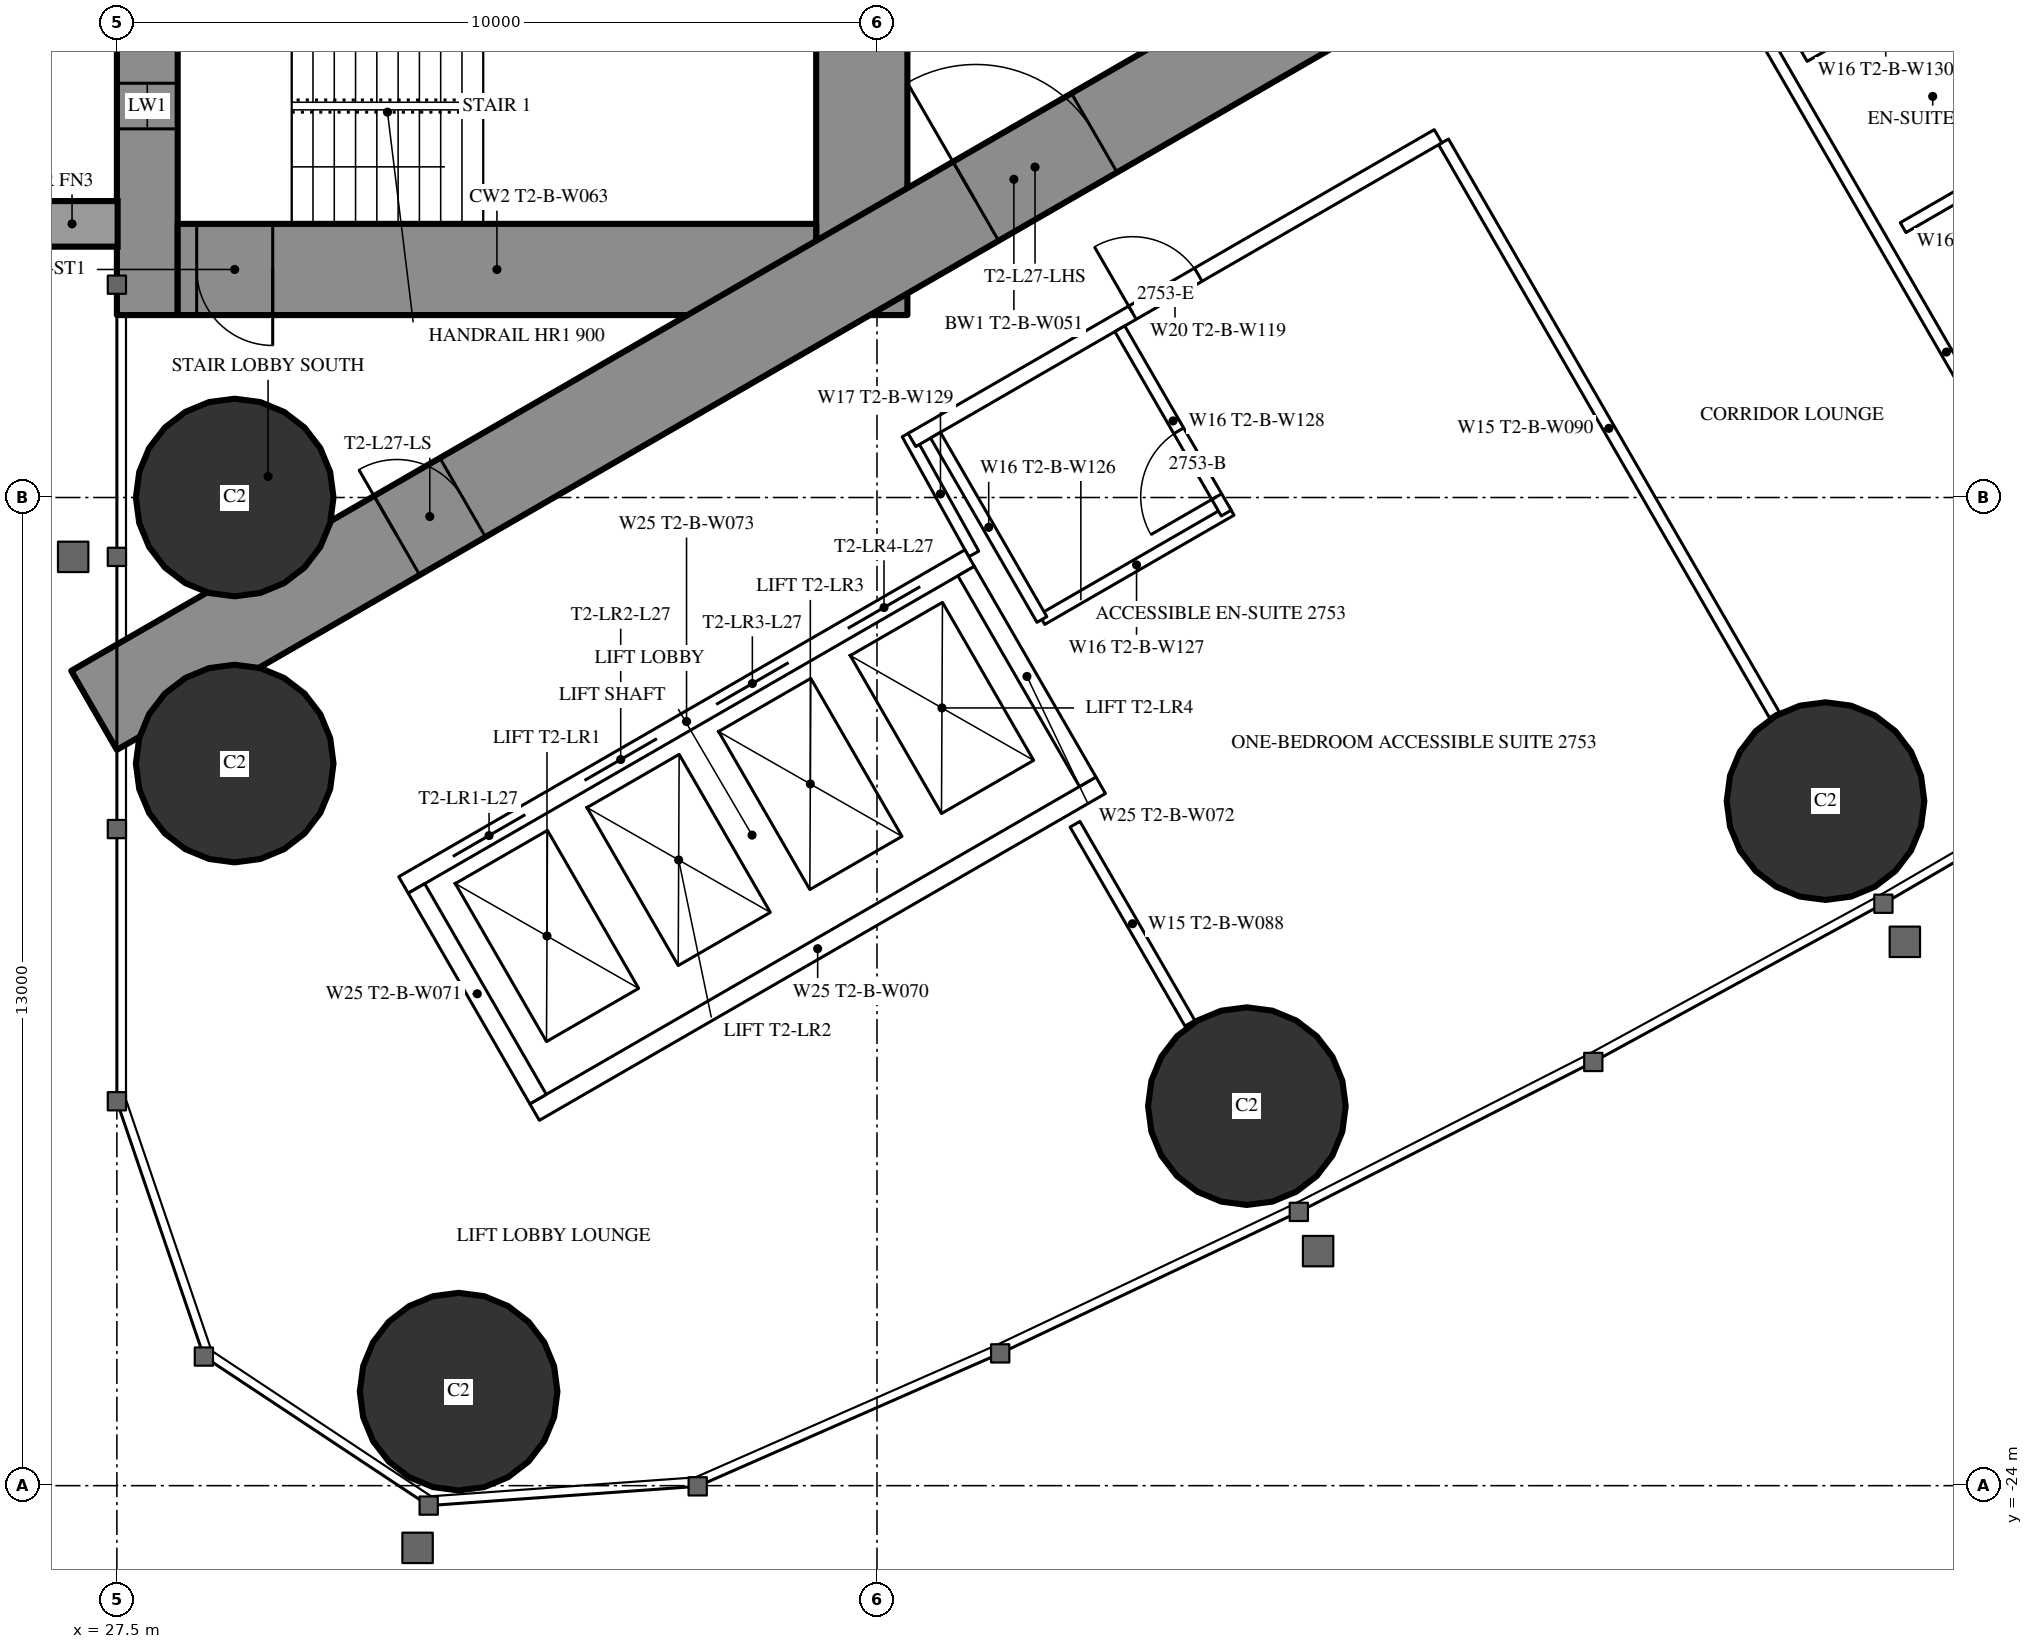
"""IFC4 building model, lengths in metres.
Left out: names, types, materials, properties, quantities, classifications, styles, units other than length and angle.
Written with IfcOpenShell. Run it as: python <this file> out.ifc"""

import sys

from ifc_helpers import new_model, si_unit, direction, frame, frame_2d, origin, origin_2d, place, context, subcontext, project, spatial, rectangle, hollow_circle, extrude, element, fill, save


model = new_model("IFC4")
c1 = context("Model", 3, precision=1e-05, world=origin(), true_north=direction((0.0, 1.0)))
c2 = subcontext(c1, "Body", "Model", "MODEL_VIEW")
j1 = project(units=[si_unit("LENGTHUNIT", "METRE"), si_unit("PLANEANGLEUNIT", "RADIAN")], contexts=[c1])
p1 = place(None, origin())
s1 = spatial("IfcSite", under=j1, at=p1, CompositionType="ELEMENT")
p2 = place(p1, origin())
s2 = spatial("IfcBuilding", under=s1, at=p2, CompositionType="ELEMENT")
p3 = place(p2, frame((0.0, 0.0, 104.6)))
s3 = spatial("IfcBuildingStorey", under=s2, at=p3, CompositionType="ELEMENT", Elevation=104.6)
for number, where, z_axis, x_axis in (
    (1, (31.996, -22.763, 0.0), (0.0, 0.0, 1.0), (1.0, 0.0, 0.0)),
    (2, (29.05, -11.0, 0.0), (0.0, 0.0, 1.0), (1.0, 0.0, 0.0)),
    (3, (29.05, -14.5, 0.0), (0.0, 0.0, 1.0), (1.0, 0.0, 0.0)),
    (4, (42.366, -19.007, 0.0), (0.0, 0.0, 1.0), (1.0, 0.0, 0.0)),
    (5, (49.979, -14.994, 0.0), (0.0, 0.0, 1.0), (1.0, 0.0, 0.0)),
):
    element("IfcColumn", number, at=place(p3, frame(where, z_axis=z_axis, x_axis=x_axis)), inside=s3, PredefinedType="COLUMN", context=c2, shape_type="SweptSolid", body=[
        extrude(hollow_circle(Radius=1.3, WallThickness=0.1, at=origin_2d()), origin(), (0.0, 0.0, 1.0), 3.5),
    ])
p4 = place(p3, frame((27.9, -8.6, 0.0), z_axis=(0.0, 0.0, 1.0), x_axis=(0.0, 1.0, 0.0)))
e6 = element("IfcWall", 6, at=p4, inside=s3, PredefinedType="SHEAR", context=c2, shape_type="SweptSolid", body=[
    extrude(rectangle(XDim=17.2, YDim=0.8, at=frame_2d((8.6, 0.0))), origin(), (0.0, 0.0, 1.0), 3.5),
])
p5 = place(p4, frame((2.45, 0.0, 0.6)))
e7 = element("IfcOpeningElement", 7, at=p5, cuts=e6, PredefinedType="OPENING", context=c2, shape_type="SweptSolid", body=[
    extrude(rectangle(XDim=0.6, YDim=2.1, at=frame_2d((0.3, 1.05))), frame((0.0, 0.41, 0.0), z_axis=(0.0, -1.0, 0.0), x_axis=(1.0, 0.0, 0.0)), (0.0, 0.0, 1.0), 0.82),
])
p6 = place(p4, frame((14.15, 0.0, 0.6)))
e8 = element("IfcOpeningElement", 8, at=p6, cuts=e6, PredefinedType="OPENING", context=c2, shape_type="SweptSolid", body=[
    extrude(rectangle(XDim=0.6, YDim=2.1, at=frame_2d((0.3, 1.05))), frame((0.0, 0.41, 0.0), z_axis=(0.0, -1.0, 0.0), x_axis=(1.0, 0.0, 0.0)), (0.0, 0.0, 1.0), 0.82),
])
p7 = place(p3, frame((37.3, -8.6, 0.0), z_axis=(0.0, 0.0, 1.0), x_axis=(0.0, 1.0, 0.0)))
e9 = element("IfcWall", 9, at=p7, inside=s3, PredefinedType="SHEAR", context=c2, shape_type="SweptSolid", body=[
    extrude(rectangle(XDim=17.2, YDim=1.2, at=frame_2d((8.6, 0.0))), origin(), (0.0, 0.0, 1.0), 3.5),
])
p8 = place(p7, frame((7.7, 0.0, 0.0)))
e10 = element("IfcOpeningElement", 10, at=p8, cuts=e9, PredefinedType="OPENING", context=c2, shape_type="SweptSolid", body=[
    extrude(rectangle(XDim=1.8, YDim=2.2, at=frame_2d((0.9, 1.1))), frame((0.0, 0.61, 0.0), z_axis=(0.0, -1.0, 0.0), x_axis=(1.0, 0.0, 0.0)), (0.0, 0.0, 1.0), 1.22),
])
p9 = place(p3, frame((28.3, -8.0, 0.0), z_axis=(0.0, 0.0, 1.0), x_axis=(1.0, 0.0, 0.0)))
e11 = element("IfcWall", 11, at=p9, inside=s3, PredefinedType="SHEAR", context=c2, shape_type="SweptSolid", body=[
    extrude(rectangle(XDim=8.4, YDim=1.2, at=frame_2d((4.2, 0.0))), origin(), (0.0, 0.0, 1.0), 3.5),
])
p10 = place(p9, frame((0.25, 0.0, 0.0)))
e12 = element("IfcOpeningElement", 12, at=p10, cuts=e11, PredefinedType="OPENING", context=c2, shape_type="SweptSolid", body=[
    extrude(rectangle(XDim=1.0, YDim=2.2, at=frame_2d((0.5, 1.1))), frame((0.0, 0.61, 0.0), z_axis=(0.0, -1.0, 0.0), x_axis=(1.0, 0.0, 0.0)), (0.0, 0.0, 1.0), 1.22),
])
p11 = place(p3, frame((27.2, -13.8, 0.0), z_axis=(0.0, 0.0, 1.0), x_axis=(0.866027159892, 0.499996958321, 0.0)))
e13 = element("IfcWall", 13, at=p11, inside=s3, PredefinedType="SHEAR", context=c2, shape_type="SweptSolid", body=[
    extrude(rectangle(XDim=27.947, YDim=1.2, at=frame_2d((13.973, 0.0))), origin(), (0.0, 0.0, 1.0), 3.5),
])
p12 = place(p11, frame((4.6, 0.0, 0.0)))
e14 = element("IfcOpeningElement", 14, at=p12, cuts=e13, PredefinedType="OPENING", context=c2, shape_type="SweptSolid", body=[
    extrude(rectangle(XDim=1.0, YDim=2.2, at=frame_2d((0.5, 1.1))), frame((0.0, 0.61, 0.0), z_axis=(0.0, -1.0, 0.0), x_axis=(1.0, 0.0, 0.0)), (0.0, 0.0, 1.0), 1.22),
])
p13 = place(p11, frame((13.395, 0.0, 0.0)))
e15 = element("IfcOpeningElement", 15, at=p13, cuts=e13, PredefinedType="OPENING", context=c2, shape_type="SweptSolid", body=[
    extrude(rectangle(XDim=1.8, YDim=2.2, at=frame_2d((0.9, 1.1))), frame((0.0, 0.61, 0.0), z_axis=(0.0, -1.0, 0.0), x_axis=(1.0, 0.0, 0.0)), (0.0, 0.0, 1.0), 1.22),
])
p14 = place(p3, frame((44.954, -6.321, 0.0), z_axis=(0.0, 0.0, 1.0), x_axis=(0.500018676722, -0.866014620505, 0.0)))
e16 = element("IfcWall", 16, at=p14, inside=s3, PredefinedType="PARTITIONING", context=c2, shape_type="SweptSolid", body=[
    extrude(rectangle(XDim=8.704, YDim=0.15, at=frame_2d((4.352, 0.0))), origin(), (0.0, 0.0, 1.0), 2.2),
])
p15 = place(p3, frame((48.719, -4.147, 0.0), z_axis=(0.0, 0.0, 1.0), x_axis=(0.499990498062, -0.866030889661, 0.0)))
e17 = element("IfcWall", 17, at=p15, inside=s3, PredefinedType="PARTITIONING", context=c2, shape_type="SweptSolid", body=[
    extrude(rectangle(XDim=11.406, YDim=0.15, at=frame_2d((5.703, 0.0))), origin(), (0.0, 0.0, 1.0), 3.25),
])
p16 = place(p3, frame((40.105, -15.299, 0.0), z_axis=(0.0, 0.0, 1.0), x_axis=(0.499978822259, -0.866037630414, 0.0)))
e18 = element("IfcWall", 18, at=p16, inside=s3, PredefinedType="PARTITIONING", context=c2, shape_type="SweptSolid", body=[
    extrude(rectangle(XDim=3.023, YDim=0.15, at=frame_2d((1.511, 0.0))), origin(), (0.0, 0.0, 1.0), 3.25),
])
p17 = place(p3, frame((38.773, -11.742, 0.0), z_axis=(0.0, 0.0, 1.0), x_axis=(-0.485528096672, 0.8742210632, 0.0)))
e19 = element("IfcWall", 19, at=p17, inside=s3, PredefinedType="PARTITIONING", context=c2, shape_type="SweptSolid", body=[
    extrude(rectangle(XDim=1.805, YDim=0.15, at=frame_2d((0.903, 0.0))), origin(), (0.0, 0.0, 1.0), 3.25),
])
p18 = place(p3, frame((37.96, -10.243, 0.0), z_axis=(0.0, 0.0, 1.0), x_axis=(0.86603350054, 0.499985975746, 0.0)))
e20 = element("IfcWall", 20, at=p18, inside=s3, PredefinedType="PARTITIONING", context=c2, shape_type="SweptSolid", body=[
    extrude(rectangle(XDim=7.993, YDim=0.2, at=frame_2d((3.997, 0.0))), origin(), (0.0, 0.0, 1.0), 3.25),
])
p19 = place(p18, frame((3.35, 0.0, 0.0)))
e21 = element("IfcOpeningElement", 21, at=p19, cuts=e20, PredefinedType="OPENING", context=c2, shape_type="SweptSolid", body=[
    extrude(rectangle(XDim=1.0, YDim=2.2, at=frame_2d((0.5, 1.1))), frame((0.0, 0.11, 0.0), z_axis=(0.0, -1.0, 0.0), x_axis=(1.0, 0.0, 0.0)), (0.0, 0.0, 1.0), 0.22),
])
for number, where, z_axis, x_axis in (
    (22, (51.0, -7.449, 0.0), (0.0, 0.0, 1.0), (0.866, 0.5, 0.0)),
    (23, (49.7, -5.198, 0.0), (0.0, 0.0, 1.0), (0.866, 0.5, 0.0)),
):
    element("IfcWall", number, at=place(p3, frame(where, z_axis=z_axis, x_axis=x_axis)), inside=s3, PredefinedType="PARTITIONING", context=c2, shape_type="SweptSolid", body=[
        extrude(rectangle(XDim=2.475, YDim=0.15, at=frame_2d((1.237, 0.0))), origin(), (0.0, 0.0, 1.0), 3.25),
    ])
p20 = place(p3, frame((39.67, -12.605, 0.0), z_axis=(0.0, 0.0, 1.0), x_axis=(0.866018712932, 0.500011588718, 0.0)))
e24 = element("IfcWall", 24, at=p20, inside=s3, PredefinedType="PARTITIONING", context=c2, shape_type="SweptSolid", body=[
    extrude(rectangle(XDim=2.875, YDim=0.15, at=frame_2d((1.438, 0.0))), origin(), (0.0, 0.0, 1.0), 3.25),
])
p21 = place(p3, frame((40.695, -8.78, 0.0), z_axis=(0.0, 0.0, 1.0), x_axis=(0.500049511043, -0.865996816683, 0.0)))
e25 = element("IfcWall", 25, at=p21, inside=s3, PredefinedType="PARTITIONING", context=c2, shape_type="SweptSolid", body=[
    extrude(rectangle(XDim=2.8, YDim=0.15, at=frame_2d((1.4, 0.0))), origin(), (0.0, 0.0, 1.0), 3.25),
])
p22 = place(p21, frame((1.55, 0.0, 0.0)))
e26 = element("IfcOpeningElement", 26, at=p22, cuts=e25, PredefinedType="OPENING", context=c2, shape_type="SweptSolid", body=[
    extrude(rectangle(XDim=1.0, YDim=2.2, at=frame_2d((0.5, 1.1))), frame((0.0, 0.085, 0.0), z_axis=(0.0, -1.0, 0.0), x_axis=(1.0, 0.0, 0.0)), (0.0, 0.0, 1.0), 0.17),
])
p23 = place(p3, frame((38.27, -10.18, 0.0), z_axis=(0.0, 0.0, 1.0), x_axis=(0.500049511043, -0.865996816683, 0.0)))
e27 = element("IfcWall", 27, at=p23, inside=s3, PredefinedType="PARTITIONING", context=c2, shape_type="SweptSolid", body=[
    extrude(rectangle(XDim=2.8, YDim=0.15, at=frame_2d((1.4, 0.0))), origin(), (0.0, 0.0, 1.0), 3.25),
])
p24 = place(p3, frame((31.271, -16.097, 0.0), z_axis=(0.0, 0.0, 1.0), x_axis=(0.86604045752, 0.499973925258, 0.0)))
e28 = element("IfcWall", 28, at=p24, inside=s3, PredefinedType="PARTITIONING", context=c2, shape_type="SweptSolid", body=[
    extrude(rectangle(XDim=8.6, YDim=0.25, at=frame_2d((4.3, 0.0))), origin(), (0.0, 0.0, 1.0), 3.25),
])
p25 = place(p24, frame((0.75, 0.0, 0.0)))
e29 = element("IfcOpeningElement", 29, at=p25, cuts=e28, PredefinedType="OPENING", context=c2, shape_type="SweptSolid", body=[
    extrude(rectangle(XDim=1.1, YDim=2.2, at=frame_2d((0.55, 1.1))), frame((0.0, 0.135, 0.0), z_axis=(0.0, -1.0, 0.0), x_axis=(1.0, 0.0, 0.0)), (0.0, 0.0, 1.0), 0.27),
])
p26 = place(p24, frame((2.75, 0.0, 0.0)))
e30 = element("IfcOpeningElement", 30, at=p26, cuts=e28, PredefinedType="OPENING", context=c2, shape_type="SweptSolid", body=[
    extrude(rectangle(XDim=1.1, YDim=2.2, at=frame_2d((0.55, 1.1))), frame((0.0, 0.135, 0.0), z_axis=(0.0, -1.0, 0.0), x_axis=(1.0, 0.0, 0.0)), (0.0, 0.0, 1.0), 0.27),
])
p27 = place(p24, frame((4.75, 0.0, 0.0)))
e31 = element("IfcOpeningElement", 31, at=p27, cuts=e28, PredefinedType="OPENING", context=c2, shape_type="SweptSolid", body=[
    extrude(rectangle(XDim=1.1, YDim=2.2, at=frame_2d((0.55, 1.1))), frame((0.0, 0.135, 0.0), z_axis=(0.0, -1.0, 0.0), x_axis=(1.0, 0.0, 0.0)), (0.0, 0.0, 1.0), 0.27),
])
p28 = place(p24, frame((6.75, 0.0, 0.0)))
e32 = element("IfcOpeningElement", 32, at=p28, cuts=e28, PredefinedType="OPENING", context=c2, shape_type="SweptSolid", body=[
    extrude(rectangle(XDim=1.1, YDim=2.2, at=frame_2d((0.55, 1.1))), frame((0.0, 0.135, 0.0), z_axis=(0.0, -1.0, 0.0), x_axis=(1.0, 0.0, 0.0)), (0.0, 0.0, 1.0), 0.27),
])
p29 = place(p3, frame((32.996, -19.086, 0.0), z_axis=(0.0, 0.0, 1.0), x_axis=(0.866028165386, 0.499995216735, 0.0)))
e33 = element("IfcWall", 33, at=p29, inside=s3, PredefinedType="PARTITIONING", context=c2, shape_type="SweptSolid", body=[
    extrude(rectangle(XDim=8.6, YDim=0.25, at=frame_2d((4.3, 0.0))), origin(), (0.0, 0.0, 1.0), 3.25),
])
for number, where, z_axis, x_axis in (
    (34, (31.441, -16.143, 0.0), (0.0, 0.0, 1.0), (0.5, -0.866, 0.0)),
    (35, (38.673, -11.968, 0.0), (0.0, 0.0, 1.0), (0.5, -0.866, 0.0)),
):
    element("IfcWall", number, at=place(p3, frame(where, z_axis=z_axis, x_axis=x_axis)), inside=s3, PredefinedType="PARTITIONING", context=c2, shape_type="SweptSolid", body=[
        extrude(rectangle(XDim=3.201, YDim=0.25, at=frame_2d((1.6, 0.0))), origin(), (0.0, 0.0, 1.0), 3.25),
    ])
p30 = place(p22, origin())
e36 = element("IfcDoor", 36, at=p30, inside=s3, OperationType="SINGLE_SWING_RIGHT", PredefinedType="DOOR", context=c2, shape_type="SweptSolid", body=[
    extrude(rectangle(XDim=1.0, YDim=2.2, at=frame_2d((0.5, 1.1))), frame((0.0, 0.025, 0.0), z_axis=(0.0, -1.0, 0.0), x_axis=(1.0, 0.0, 0.0)), (0.0, 0.0, 1.0), 0.05),
])
fill(e26, e36)
p31 = place(p19, origin())
e37 = element("IfcDoor", 37, at=p31, inside=s3, OperationType="SINGLE_SWING_LEFT", PredefinedType="DOOR", context=c2, shape_type="SweptSolid", body=[
    extrude(rectangle(XDim=1.0, YDim=2.2, at=frame_2d((0.5, 1.1))), frame((0.0, 0.025, 0.0), z_axis=(0.0, -1.0, 0.0), x_axis=(1.0, 0.0, 0.0)), (0.0, 0.0, 1.0), 0.05),
])
fill(e21, e37)
p32 = place(p12, origin())
e38 = element("IfcDoor", 38, at=p32, inside=s3, OperationType="SINGLE_SWING_LEFT", PredefinedType="DOOR", context=c2, shape_type="SweptSolid", body=[
    extrude(rectangle(XDim=1.0, YDim=2.2, at=frame_2d((0.5, 1.1))), frame((0.0, 0.025, 0.0), z_axis=(0.0, -1.0, 0.0), x_axis=(1.0, 0.0, 0.0)), (0.0, 0.0, 1.0), 0.05),
])
fill(e14, e38)
p33 = place(p13, origin())
e39 = element("IfcDoor", 39, at=p33, inside=s3, OperationType="DOUBLE_DOOR_SINGLE_SWING", PredefinedType="DOOR", context=c2, shape_type="SweptSolid", body=[
    extrude(rectangle(XDim=1.8, YDim=2.2, at=frame_2d((0.9, 1.1))), frame((0.0, 0.025, 0.0), z_axis=(0.0, -1.0, 0.0), x_axis=(1.0, 0.0, 0.0)), (0.0, 0.0, 1.0), 0.05),
])
fill(e15, e39)
p34 = place(p10, origin())
e40 = element("IfcDoor", 40, at=p34, inside=s3, OperationType="SINGLE_SWING_RIGHT", PredefinedType="DOOR", context=c2, shape_type="SweptSolid", body=[
    extrude(rectangle(XDim=1.0, YDim=2.2, at=frame_2d((0.5, 1.1))), frame((0.0, 0.025, 0.0), z_axis=(0.0, -1.0, 0.0), x_axis=(1.0, 0.0, 0.0)), (0.0, 0.0, 1.0), 0.05),
])
fill(e12, e40)
p35 = place(p25, origin())
e41 = element("IfcDoor", 41, at=p35, inside=s3, OperationType="DOUBLE_DOOR_SLIDING", PredefinedType="USERDEFINED", context=c2, shape_type="SweptSolid", body=[
    extrude(rectangle(XDim=1.1, YDim=2.2, at=frame_2d((0.55, 1.1))), frame((0.0, 0.025, 0.0), z_axis=(0.0, -1.0, 0.0), x_axis=(1.0, 0.0, 0.0)), (0.0, 0.0, 1.0), 0.05),
])
fill(e29, e41)
p36 = place(p26, origin())
e42 = element("IfcDoor", 42, at=p36, inside=s3, OperationType="DOUBLE_DOOR_SLIDING", PredefinedType="USERDEFINED", context=c2, shape_type="SweptSolid", body=[
    extrude(rectangle(XDim=1.1, YDim=2.2, at=frame_2d((0.55, 1.1))), frame((0.0, 0.025, 0.0), z_axis=(0.0, -1.0, 0.0), x_axis=(1.0, 0.0, 0.0)), (0.0, 0.0, 1.0), 0.05),
])
fill(e30, e42)
p37 = place(p27, origin())
e43 = element("IfcDoor", 43, at=p37, inside=s3, OperationType="DOUBLE_DOOR_SLIDING", PredefinedType="USERDEFINED", context=c2, shape_type="SweptSolid", body=[
    extrude(rectangle(XDim=1.1, YDim=2.2, at=frame_2d((0.55, 1.1))), frame((0.0, 0.025, 0.0), z_axis=(0.0, -1.0, 0.0), x_axis=(1.0, 0.0, 0.0)), (0.0, 0.0, 1.0), 0.05),
])
fill(e31, e43)
p38 = place(p28, origin())
e44 = element("IfcDoor", 44, at=p38, inside=s3, OperationType="DOUBLE_DOOR_SLIDING", PredefinedType="USERDEFINED", context=c2, shape_type="SweptSolid", body=[
    extrude(rectangle(XDim=1.1, YDim=2.2, at=frame_2d((0.55, 1.1))), frame((0.0, 0.025, 0.0), z_axis=(0.0, -1.0, 0.0), x_axis=(1.0, 0.0, 0.0)), (0.0, 0.0, 1.0), 0.05),
])
fill(e32, e44)
p39 = place(p5, origin())
e45 = element("IfcWindow", 45, at=p39, inside=s3, PartitioningType="SINGLE_PANEL", PredefinedType="WINDOW", context=c2, shape_type="SweptSolid", body=[
    extrude(rectangle(XDim=0.6, YDim=2.1, at=frame_2d((0.3, 1.05))), frame((0.0, 0.03, 0.0), z_axis=(0.0, -1.0, 0.0), x_axis=(1.0, 0.0, 0.0)), (0.0, 0.0, 1.0), 0.06),
])
fill(e7, e45)
save(model, sys.argv[1])
